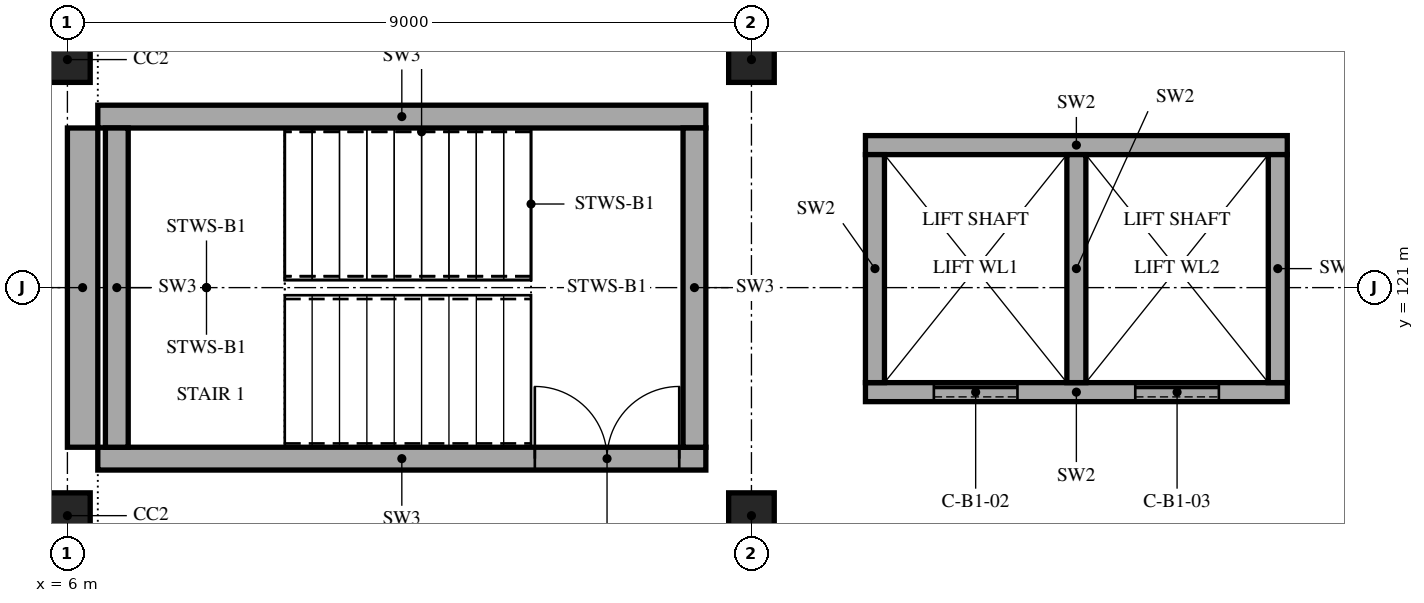
"""IFC4 building model, lengths in metres.
Left out: names, types, materials, properties, quantities, classifications, styles, units other than length and angle.
Written with IfcOpenShell. Run it as: python <this file> out.ifc"""

import sys

from ifc_helpers import new_model, si_unit, direction, frame, frame_2d, origin, origin_2d, place, context, subcontext, project, spatial, rectangle, extrude, element, fill, save


model = new_model("IFC4")
c1 = context("Model", 3, precision=1e-05, world=origin(), true_north=direction((0.0, 1.0)))
c2 = subcontext(c1, "Body", "Model", "MODEL_VIEW")
j1 = project(units=[si_unit("LENGTHUNIT", "METRE"), si_unit("PLANEANGLEUNIT", "RADIAN")], contexts=[c1])
p1 = place(None, origin())
s1 = spatial("IfcSite", under=j1, at=p1, CompositionType="ELEMENT")
p2 = place(p1, origin())
s2 = spatial("IfcBuilding", under=s1, at=p2, CompositionType="ELEMENT")
p3 = place(p2, frame((0.0, 0.0, -4.2)))
s3 = spatial("IfcBuildingStorey", under=s2, at=p3, CompositionType="ELEMENT", Elevation=-4.2)
for number, where, z_axis, x_axis in (
    (1, (6.0, 118.0, 0.0), (0.0, 0.0, 1.0), (1.0, 0.0, 0.0)),
    (2, (6.0, 124.0, 0.0), (0.0, 0.0, 1.0), (1.0, 0.0, 0.0)),
    (3, (15.0, 118.0, 0.0), (0.0, 0.0, 1.0), (1.0, 0.0, 0.0)),
    (4, (15.0, 124.0, 0.0), (0.0, 0.0, 1.0), (1.0, 0.0, 0.0)),
):
    element("IfcColumn", number, at=place(p3, frame(where, z_axis=z_axis, x_axis=x_axis)), inside=s3, PredefinedType="COLUMN", context=c2, shape_type="SweptSolid", body=[
        extrude(rectangle(XDim=0.6, YDim=0.6, at=origin_2d()), origin(), (0.0, 0.0, 1.0), 4.2),
    ])
p4 = place(p3, frame((6.4, 118.75, 0.0), z_axis=(0.0, 0.0, 1.0), x_axis=(1.0, 0.0, 0.0)))
e5 = element("IfcWall", 5, at=p4, inside=s3, PredefinedType="SHEAR", context=c2, shape_type="SweptSolid", body=[
    extrude(rectangle(XDim=8.0, YDim=0.3, at=frame_2d((4.0, 0.0))), origin(), (0.0, 0.0, 1.0), 4.2),
])
p5 = place(p4, frame((5.75, 0.0, 0.0)))
e6 = element("IfcOpeningElement", 6, at=p5, cuts=e5, PredefinedType="OPENING", context=c2, shape_type="SweptSolid", body=[
    extrude(rectangle(XDim=1.9, YDim=2.1, at=frame_2d((0.95, 1.05))), frame((0.0, 0.16, 0.0), z_axis=(0.0, -1.0, 0.0), x_axis=(1.0, 0.0, 0.0)), (0.0, 0.0, 1.0), 0.32),
])
p6 = place(p3, frame((6.4, 123.25, 0.0), z_axis=(0.0, 0.0, 1.0), x_axis=(1.0, 0.0, 0.0)))
e7 = element("IfcWall", 7, at=p6, inside=s3, PredefinedType="SHEAR", context=c2, shape_type="SweptSolid", body=[
    extrude(rectangle(XDim=8.0, YDim=0.3, at=frame_2d((4.0, 0.0))), origin(), (0.0, 0.0, 1.0), 4.2),
])
for number, where, z_axis, x_axis in (
    (8, (6.65, 118.9, 0.0), (0.0, 0.0, 1.0), (0.0, 1.0, 0.0)),
    (9, (14.25, 118.9, 0.0), (0.0, 0.0, 1.0), (0.0, 1.0, 0.0)),
):
    element("IfcWall", number, at=place(p3, frame(where, z_axis=z_axis, x_axis=x_axis)), inside=s3, PredefinedType="SHEAR", context=c2, shape_type="SweptSolid", body=[
        extrude(rectangle(XDim=4.2, YDim=0.3, at=frame_2d((2.1, 0.0))), origin(), (0.0, 0.0, 1.0), 4.2),
    ])
p7 = place(p3, frame((16.5, 119.625, 0.0), z_axis=(0.0, 0.0, 1.0), x_axis=(1.0, 0.0, 0.0)))
e10 = element("IfcWall", 10, at=p7, inside=s3, PredefinedType="SHEAR", context=c2, shape_type="SweptSolid", body=[
    extrude(rectangle(XDim=5.55, YDim=0.25, at=frame_2d((2.775, 0.0))), origin(), (0.0, 0.0, 1.0), 4.2),
])
p8 = place(p7, frame((0.9, 0.0, 0.0)))
e11 = element("IfcOpeningElement", 11, at=p8, cuts=e10, PredefinedType="OPENING", context=c2, shape_type="SweptSolid", body=[
    extrude(rectangle(XDim=1.1, YDim=2.1, at=frame_2d((0.55, 1.05))), frame((0.0, 0.135, 0.0), z_axis=(0.0, -1.0, 0.0), x_axis=(1.0, 0.0, 0.0)), (0.0, 0.0, 1.0), 0.27),
])
p9 = place(p7, frame((3.55, 0.0, 0.0)))
e12 = element("IfcOpeningElement", 12, at=p9, cuts=e10, PredefinedType="OPENING", context=c2, shape_type="SweptSolid", body=[
    extrude(rectangle(XDim=1.1, YDim=2.1, at=frame_2d((0.55, 1.05))), frame((0.0, 0.135, 0.0), z_axis=(0.0, -1.0, 0.0), x_axis=(1.0, 0.0, 0.0)), (0.0, 0.0, 1.0), 0.27),
])
p10 = place(p3, frame((16.5, 122.875, 0.0), z_axis=(0.0, 0.0, 1.0), x_axis=(1.0, 0.0, 0.0)))
e13 = element("IfcWall", 13, at=p10, inside=s3, PredefinedType="SHEAR", context=c2, shape_type="SweptSolid", body=[
    extrude(rectangle(XDim=5.55, YDim=0.25, at=frame_2d((2.775, 0.0))), origin(), (0.0, 0.0, 1.0), 4.2),
])
for number, where, z_axis, x_axis in (
    (14, (16.625, 119.75, 0.0), (0.0, 0.0, 1.0), (0.0, 1.0, 0.0)),
    (15, (21.925, 119.75, 0.0), (0.0, 0.0, 1.0), (0.0, 1.0, 0.0)),
    (16, (19.275, 119.75, 0.0), (0.0, 0.0, 1.0), (0.0, 1.0, 0.0)),
):
    element("IfcWall", number, at=place(p3, frame(where, z_axis=z_axis, x_axis=x_axis)), inside=s3, PredefinedType="SHEAR", context=c2, shape_type="SweptSolid", body=[
        extrude(rectangle(XDim=3.0, YDim=0.25, at=frame_2d((1.5, 0.0))), origin(), (0.0, 0.0, 1.0), 4.2),
    ])
p11 = place(p3, frame((6.2, 118.9, 0.0), z_axis=(0.0, 0.0, 1.0), x_axis=(0.0, 1.0, 0.0)))
e17 = element("IfcWall", 17, at=p11, inside=s3, PredefinedType="SOLIDWALL", context=c2, shape_type="SweptSolid", body=[
    extrude(rectangle(XDim=4.2, YDim=0.4, at=frame_2d((2.1, 0.0))), origin(), (0.0, 0.0, 1.0), 4.2),
])
p12 = place(p5, origin())
e18 = element("IfcDoor", 18, at=p12, inside=s3, OperationType="DOUBLE_DOOR_SINGLE_SWING", PredefinedType="NOTDEFINED", context=c2, shape_type="SweptSolid", body=[
    extrude(rectangle(XDim=1.9, YDim=2.1, at=frame_2d((0.95, 1.05))), frame((0.0, 0.025, 0.0), z_axis=(0.0, -1.0, 0.0), x_axis=(1.0, 0.0, 0.0)), (0.0, 0.0, 1.0), 0.05),
])
fill(e6, e18)
p13 = place(p8, origin())
e19 = element("IfcDoor", 19, at=p13, inside=s3, OperationType="DOUBLE_DOOR_SLIDING", PredefinedType="NOTDEFINED", context=c2, shape_type="SweptSolid", body=[
    extrude(rectangle(XDim=1.1, YDim=2.1, at=frame_2d((0.55, 1.05))), frame((0.0, 0.025, 0.0), z_axis=(0.0, -1.0, 0.0), x_axis=(1.0, 0.0, 0.0)), (0.0, 0.0, 1.0), 0.05),
])
fill(e11, e19)
p14 = place(p9, origin())
e20 = element("IfcDoor", 20, at=p14, inside=s3, OperationType="DOUBLE_DOOR_SLIDING", PredefinedType="NOTDEFINED", context=c2, shape_type="SweptSolid", body=[
    extrude(rectangle(XDim=1.1, YDim=2.1, at=frame_2d((0.55, 1.05))), frame((0.0, 0.025, 0.0), z_axis=(0.0, -1.0, 0.0), x_axis=(1.0, 0.0, 0.0)), (0.0, 0.0, 1.0), 0.05),
])
fill(e12, e20)
save(model, sys.argv[1])
